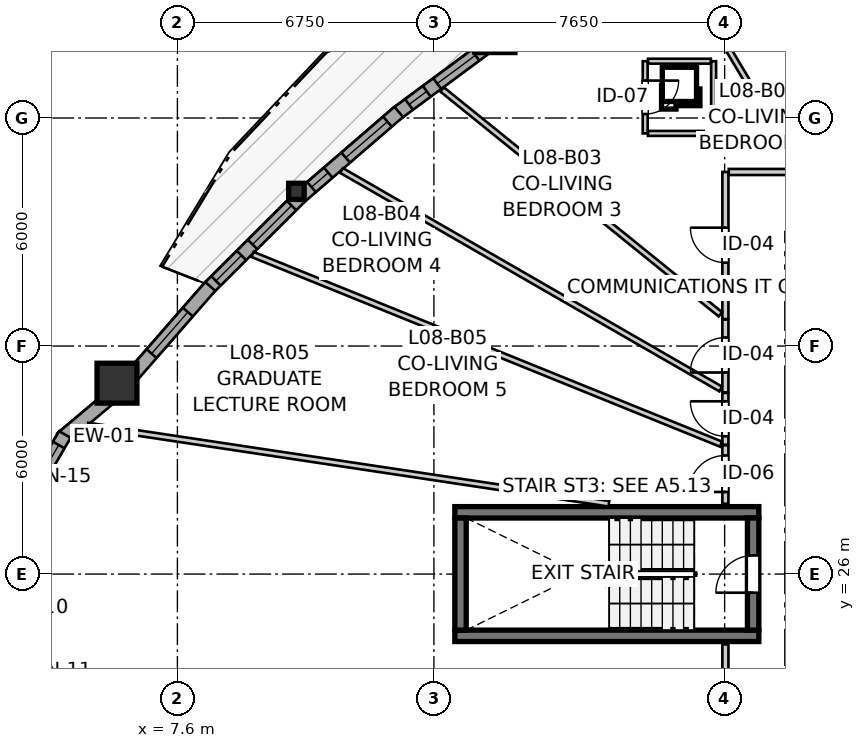
"""IFC4 building model, lengths in metres.
Left out: names, types, materials, properties, quantities, classifications, styles, units other than length and angle.
Written with IfcOpenShell. Run it as: python <this file> out.ifc"""

import sys

from ifc_helpers import new_model, si_unit, direction, frame, frame_2d, origin, origin_2d, place, context, subcontext, project, spatial, rectangle, i_section, extrude, source, transform, mapped, element, fill, save


model = new_model("IFC4")
c1 = context("Model", 3, precision=1e-05, world=origin(), true_north=direction((0.0, 1.0)))
c2 = subcontext(c1, "Body", "Model", "MODEL_VIEW")
j1 = project(units=[si_unit("LENGTHUNIT", "METRE"), si_unit("PLANEANGLEUNIT", "RADIAN")], contexts=[c1])
p1 = place(None, origin())
s1 = spatial("IfcSite", under=j1, at=p1, CompositionType="ELEMENT")
p2 = place(p1, origin())
s2 = spatial("IfcBuilding", under=s1, at=p2, CompositionType="ELEMENT")
p3 = place(p2, frame((0.0, 0.0, 30.2)))
s3 = spatial("IfcBuildingStorey", under=s2, at=p3, CompositionType="ELEMENT", Elevation=30.2)
for number, where, z_axis, x_axis in (
    (1, (14.9, 24.375, 0.0), (0.0, 0.0, 1.0), (1.0, 0.0, 0.0)),
    (2, (22.9, 27.625, 0.0), (0.0, 0.0, 1.0), (-1.0, 0.0, 0.0)),
):
    element("IfcWall", number, at=place(p3, frame(where, z_axis=z_axis, x_axis=x_axis)), inside=s3, PredefinedType="SHEAR", context=c2, shape_type="SweptSolid", body=[
        extrude(rectangle(XDim=8.0, YDim=0.3, at=frame_2d((4.0, 0.0))), origin(), (0.0, 0.0, 1.0), 2.935),
    ])
p4 = place(p3, frame((15.05, 27.475, 0.0), z_axis=(0.0, 0.0, 1.0), x_axis=(0.0, -1.0, 0.0)))
e3 = element("IfcWall", 3, at=p4, inside=s3, PredefinedType="SHEAR", context=c2, shape_type="SweptSolid", body=[
    extrude(rectangle(XDim=2.95, YDim=0.3, at=frame_2d((1.475, 0.0))), origin(), (0.0, 0.0, 1.0), 2.935),
])
p5 = place(p3, frame((22.75, 24.525, 0.0), z_axis=(0.0, 0.0, 1.0), x_axis=(0.0, 1.0, 0.0)))
e4 = element("IfcWall", 4, at=p5, inside=s3, PredefinedType="SHEAR", context=c2, shape_type="SweptSolid", body=[
    extrude(rectangle(XDim=2.95, YDim=0.3, at=frame_2d((1.475, 0.0))), origin(), (0.0, 0.0, 1.0), 2.935),
])
p6 = place(p5, frame((0.985, 0.0, 0.0)))
e5 = element("IfcOpeningElement", 5, at=p6, cuts=e4, PredefinedType="OPENING", context=c2, shape_type="SweptSolid", body=[
    extrude(rectangle(XDim=0.98, YDim=2.15, at=frame_2d((0.49, 1.075))), frame((0.0, 0.16, 0.0), z_axis=(0.0, -1.0, 0.0), x_axis=(1.0, 0.0, 0.0)), (0.0, 0.0, 1.0), 0.32),
])
m1 = source(origin(), c2, "Body", "SweptSolid", [
    extrude(rectangle(XDim=1.05, YDim=1.05, at=origin_2d()), origin(), (0.0, 0.0, 1.0), 2.935),
])
for number, where, z_axis, x_axis in (
    (6, (6.01, 31.023, 0.0), (0.0, 0.0, 1.0), (1.0, 0.0, 0.0)),
    (7, (15.956, 40.247, 0.0), (0.0, 0.0, 1.0), (1.0, 0.0, 0.0)),
):
    element("IfcColumn", number, at=place(p3, frame(where, z_axis=z_axis, x_axis=x_axis)), inside=s3, PredefinedType="COLUMN", context=c2, shape_type="MappedRepresentation", body=[
        mapped(m1, transform((0.0, 0.0, 0.0), x_axis=(1.0, 0.0, 0.0), y_axis=(0.0, 1.0, 0.0), z_axis=(0.0, 0.0, 1.0), scale=1.0)),
    ])
m2 = source(origin(), c2, "Body", "SweptSolid", [
    extrude(i_section(OverallWidth=0.409, OverallDepth=0.425, WebThickness=0.03, FlangeThickness=0.048, FilletRadius=0.015, at=origin_2d()), origin(), (0.0, 0.0, 1.0), 2.935),
])
p7 = place(p3, frame((10.732, 36.07, 0.0), z_axis=(0.0, 0.0, 1.0), x_axis=(1.0, 0.0, 0.0)))
e8 = element("IfcColumn", 8, at=p7, inside=s3, PredefinedType="PILASTER", context=c2, shape_type="MappedRepresentation", body=[
    mapped(m2, transform((0.0, 0.0, 0.0), x_axis=(1.0, 0.0, 0.0), y_axis=(0.0, 1.0, 0.0), z_axis=(0.0, 0.0, 1.0), scale=1.0)),
])
p8 = place(p3, frame((5.893, 30.696, 0.0), z_axis=(0.0, 0.0, 1.0), x_axis=(-0.766001205563, -0.64283913468, 0.0)))
e9 = element("IfcWall", 9, at=p8, inside=s3, PredefinedType="SOLIDWALL", context=c2, shape_type="SweptSolid", body=[
    extrude(rectangle(XDim=1.752, YDim=0.35, at=frame_2d((0.876, 0.0))), origin(), (0.0, 0.0, 1.0), 2.415),
])
p9 = place(p3, frame((4.637, 29.674, 0.0), z_axis=(0.0, 0.0, 1.0), x_axis=(-0.499995423472, -0.866028046028, 0.0)))
e10 = element("IfcWall", 10, at=p9, inside=s3, PredefinedType="SOLIDWALL", context=c2, shape_type="SweptSolid", body=[
    extrude(rectangle(XDim=2.09, YDim=0.35, at=frame_2d((1.045, 0.0))), origin(), (0.0, 0.0, 1.0), 2.415),
])
p10 = place(p9, frame((0.32, 0.0, 0.82)))
e11 = element("IfcOpeningElement", 11, at=p10, cuts=e10, PredefinedType="OPENING", context=c2, shape_type="SweptSolid", body=[
    extrude(rectangle(XDim=1.45, YDim=1.25, at=frame_2d((0.725, 0.625))), frame((0.0, 0.185, 0.0), z_axis=(0.0, -1.0, 0.0), x_axis=(1.0, 0.0, 0.0)), (0.0, 0.0, 1.0), 0.37),
])
p11 = place(p3, frame((3.592, 24.137, 0.0), z_axis=(0.0, 0.0, 1.0), x_axis=(0.499995423472, -0.866028046028, 0.0)))
e12 = element("IfcWall", 12, at=p11, inside=s3, PredefinedType="SOLIDWALL", context=c2, shape_type="SweptSolid", body=[
    extrude(rectangle(XDim=2.09, YDim=0.35, at=frame_2d((1.045, 0.0))), origin(), (0.0, 0.0, 1.0), 2.415),
])
p12 = place(p11, frame((0.42, 0.0, 0.82)))
e13 = element("IfcOpeningElement", 13, at=p12, cuts=e12, PredefinedType="OPENING", context=c2, shape_type="SweptSolid", body=[
    extrude(rectangle(XDim=1.25, YDim=1.35, at=frame_2d((0.625, 0.675))), frame((0.0, 0.185, 0.0), z_axis=(0.0, -1.0, 0.0), x_axis=(1.0, 0.0, 0.0)), (0.0, 0.0, 1.0), 0.37),
])
p13 = place(p3, frame((15.819, 39.928, 0.0), z_axis=(0.0, 0.0, 1.0), x_axis=(-0.803825144674, -0.594865645999, 0.0)))
e14 = element("IfcWall", 14, at=p13, inside=s3, PredefinedType="SOLIDWALL", context=c2, shape_type="SweptSolid", body=[
    extrude(rectangle(XDim=3.066, YDim=0.35, at=frame_2d((1.533, 0.0))), origin(), (0.0, 0.0, 1.0), 2.415),
])
p14 = place(p13, frame((0.469, 0.0, 0.82)))
e15 = element("IfcOpeningElement", 15, at=p14, cuts=e14, PredefinedType="OPENING", context=c2, shape_type="SweptSolid", body=[
    extrude(rectangle(XDim=1.25, YDim=1.35, at=frame_2d((0.625, 0.675))), frame((0.0, 0.185, 0.0), z_axis=(0.0, -1.0, 0.0), x_axis=(1.0, 0.0, 0.0)), (0.0, 0.0, 1.0), 0.37),
])
p15 = place(p13, frame((2.062, 0.0, 0.82)))
e16 = element("IfcOpeningElement", 16, at=p15, cuts=e14, PredefinedType="OPENING", context=c2, shape_type="SweptSolid", body=[
    extrude(rectangle(XDim=0.58, YDim=1.35, at=frame_2d((0.29, 0.675))), frame((0.0, 0.185, 0.0), z_axis=(0.0, -1.0, 0.0), x_axis=(1.0, 0.0, 0.0)), (0.0, 0.0, 1.0), 0.37),
])
p16 = place(p3, frame((13.424, 38.16, 0.0), z_axis=(0.0, 0.0, 1.0), x_axis=(-0.757512075852, -0.652821150805, 0.0)))
e17 = element("IfcWall", 17, at=p16, inside=s3, PredefinedType="SOLIDWALL", context=c2, shape_type="SweptSolid", body=[
    extrude(rectangle(XDim=3.384, YDim=0.35, at=frame_2d((1.692, 0.0))), origin(), (0.0, 0.0, 1.0), 2.415),
])
p17 = place(p16, frame((0.392, 0.0, 0.82)))
e18 = element("IfcOpeningElement", 18, at=p17, cuts=e17, PredefinedType="OPENING", context=c2, shape_type="SweptSolid", body=[
    extrude(rectangle(XDim=1.45, YDim=1.25, at=frame_2d((0.725, 0.625))), frame((0.0, 0.185, 0.0), z_axis=(0.0, -1.0, 0.0), x_axis=(1.0, 0.0, 0.0)), (0.0, 0.0, 1.0), 0.37),
])
p18 = place(p16, frame((2.449, 0.0, 0.82)))
e19 = element("IfcOpeningElement", 19, at=p18, cuts=e17, PredefinedType="OPENING", context=c2, shape_type="SweptSolid", body=[
    extrude(rectangle(XDim=0.58, YDim=1.35, at=frame_2d((0.29, 0.675))), frame((0.0, 0.185, 0.0), z_axis=(0.0, -1.0, 0.0), x_axis=(1.0, 0.0, 0.0)), (0.0, 0.0, 1.0), 0.37),
])
p19 = place(p3, frame((10.841, 35.932, 0.0), z_axis=(0.0, 0.0, 1.0), x_axis=(-0.708383272101, -0.70582798174, 0.0)))
e20 = element("IfcWall", 20, at=p19, inside=s3, PredefinedType="SOLIDWALL", context=c2, shape_type="SweptSolid", body=[
    extrude(rectangle(XDim=3.439, YDim=0.35, at=frame_2d((1.72, 0.0))), origin(), (0.0, 0.0, 1.0), 2.415),
])
p20 = place(p19, frame((0.334, 0.0, 0.82)))
e21 = element("IfcOpeningElement", 21, at=p20, cuts=e20, PredefinedType="OPENING", context=c2, shape_type="SweptSolid", body=[
    extrude(rectangle(XDim=1.45, YDim=1.25, at=frame_2d((0.725, 0.625))), frame((0.0, 0.185, 0.0), z_axis=(0.0, -1.0, 0.0), x_axis=(1.0, 0.0, 0.0)), (0.0, 0.0, 1.0), 0.37),
])
p21 = place(p19, frame((2.194, 0.0, 0.82)))
e22 = element("IfcOpeningElement", 22, at=p21, cuts=e20, PredefinedType="OPENING", context=c2, shape_type="SweptSolid", body=[
    extrude(rectangle(XDim=0.95, YDim=1.35, at=frame_2d((0.475, 0.675))), frame((0.0, 0.185, 0.0), z_axis=(0.0, -1.0, 0.0), x_axis=(1.0, 0.0, 0.0)), (0.0, 0.0, 1.0), 0.37),
])
p22 = place(p3, frame((8.465, 33.569, 0.0), z_axis=(0.0, 0.0, 1.0), x_axis=(-0.657600500685, -0.753366830634, 0.0)))
e23 = element("IfcWall", 23, at=p22, inside=s3, PredefinedType="SOLIDWALL", context=c2, shape_type="SweptSolid", body=[
    extrude(rectangle(XDim=3.233, YDim=0.35, at=frame_2d((1.616, 0.0))), origin(), (0.0, 0.0, 1.0), 2.415),
])
p23 = place(p22, frame((0.896, 0.0, 0.82)))
e24 = element("IfcOpeningElement", 24, at=p23, cuts=e23, PredefinedType="OPENING", context=c2, shape_type="SweptSolid", body=[
    extrude(rectangle(XDim=1.45, YDim=1.25, at=frame_2d((0.725, 0.625))), frame((0.0, 0.185, 0.0), z_axis=(0.0, -1.0, 0.0), x_axis=(1.0, 0.0, 0.0)), (0.0, 0.0, 1.0), 0.37),
])
p24 = place(p3, frame((22.02, 16.883, 0.0), z_axis=(0.0, 0.0, 1.0), x_axis=(0.0, 1.0, 0.0)))
e25 = element("IfcWall", 25, at=p24, inside=s3, PredefinedType="PARTITIONING", context=c2, shape_type="SweptSolid", body=[
    extrude(rectangle(XDim=7.267, YDim=0.16, at=frame_2d((3.633, 0.0))), origin(), (0.0, 0.0, 1.0), 2.935),
])
p25 = place(p24, frame((2.845, 0.0, 0.0)))
e26 = element("IfcOpeningElement", 26, at=p25, cuts=e25, PredefinedType="OPENING", context=c2, shape_type="SweptSolid", body=[
    extrude(rectangle(XDim=1.3, YDim=2.1, at=frame_2d((0.65, 1.05))), frame((0.0, 0.09, 0.0), z_axis=(0.0, -1.0, 0.0), x_axis=(1.0, 0.0, 0.0)), (0.0, 0.0, 1.0), 0.18),
])
p26 = place(p3, frame((22.02, 32.71, 0.0), z_axis=(0.0, 0.0, 1.0), x_axis=(0.0, 1.0, 0.0)))
e27 = element("IfcWall", 27, at=p26, inside=s3, PredefinedType="PARTITIONING", context=c2, shape_type="SweptSolid", body=[
    extrude(rectangle(XDim=3.87, YDim=0.16, at=frame_2d((1.935, 0.0))), origin(), (0.0, 0.0, 1.0), 2.935),
])
p27 = place(p26, frame((1.485, 0.0, 0.0)))
e28 = element("IfcOpeningElement", 28, at=p27, cuts=e27, PredefinedType="OPENING", context=c2, shape_type="SweptSolid", body=[
    extrude(rectangle(XDim=0.92, YDim=2.1, at=frame_2d((0.46, 1.05))), frame((0.0, 0.09, 0.0), z_axis=(0.0, -1.0, 0.0), x_axis=(1.0, 0.0, 0.0)), (0.0, 0.0, 1.0), 0.18),
])
p28 = place(p3, frame((22.02, 30.782, 0.0), z_axis=(0.0, 0.0, 1.0), x_axis=(0.0, 1.0, 0.0)))
e29 = element("IfcWall", 29, at=p28, inside=s3, PredefinedType="PARTITIONING", context=c2, shape_type="SweptSolid", body=[
    extrude(rectangle(XDim=1.913, YDim=0.16, at=frame_2d((0.957, 0.0))), origin(), (0.0, 0.0, 1.0), 2.935),
])
p29 = place(p28, frame((0.522, 0.0, 0.0)))
e30 = element("IfcOpeningElement", 30, at=p29, cuts=e29, PredefinedType="OPENING", context=c2, shape_type="SweptSolid", body=[
    extrude(rectangle(XDim=0.92, YDim=2.1, at=frame_2d((0.46, 1.05))), frame((0.0, 0.09, 0.0), z_axis=(0.0, -1.0, 0.0), x_axis=(1.0, 0.0, 0.0)), (0.0, 0.0, 1.0), 0.18),
])
p30 = place(p3, frame((19.91, 39.495, 0.0), z_axis=(0.0, 0.0, 1.0), x_axis=(0.0, -1.0, 0.0)))
e31 = element("IfcWall", 31, at=p30, inside=s3, PredefinedType="PARTITIONING", context=c2, shape_type="SweptSolid", body=[
    extrude(rectangle(XDim=1.9, YDim=0.13, at=frame_2d((0.95, 0.0))), origin(), (0.0, 0.0, 1.0), 2.935),
])
p31 = place(p30, frame((0.51, 0.0, 0.0)))
e32 = element("IfcOpeningElement", 32, at=p31, cuts=e31, PredefinedType="OPENING", context=c2, shape_type="SweptSolid", body=[
    extrude(rectangle(XDim=0.88, YDim=2.05, at=frame_2d((0.44, 1.025))), frame((0.0, 0.075, 0.0), z_axis=(0.0, -1.0, 0.0), x_axis=(1.0, 0.0, 0.0)), (0.0, 0.0, 1.0), 0.15),
])
p32 = place(p3, frame((22.02, 27.85, 0.0), z_axis=(0.0, 0.0, 1.0), x_axis=(0.0, 1.0, 0.0)))
e33 = element("IfcWall", 33, at=p32, inside=s3, PredefinedType="PARTITIONING", context=c2, shape_type="SweptSolid", body=[
    extrude(rectangle(XDim=1.539, YDim=0.16, at=frame_2d((0.77, 0.0))), origin(), (0.0, 0.0, 1.0), 2.935),
])
p33 = place(p32, frame((0.311, 0.0, 0.0)))
e34 = element("IfcOpeningElement", 34, at=p33, cuts=e33, PredefinedType="OPENING", context=c2, shape_type="SweptSolid", body=[
    extrude(rectangle(XDim=0.96, YDim=2.1, at=frame_2d((0.48, 1.05))), frame((0.0, 0.09, 0.0), z_axis=(0.0, -1.0, 0.0), x_axis=(1.0, 0.0, 0.0)), (0.0, 0.0, 1.0), 0.18),
])
p34 = place(p3, frame((22.02, 29.404, 0.0), z_axis=(0.0, 0.0, 1.0), x_axis=(0.0, 1.0, 0.0)))
e35 = element("IfcWall", 35, at=p34, inside=s3, PredefinedType="PARTITIONING", context=c2, shape_type="SweptSolid", body=[
    extrude(rectangle(XDim=1.363, YDim=0.16, at=frame_2d((0.682, 0.0))), origin(), (0.0, 0.0, 1.0), 2.935),
])
p35 = place(p34, frame((0.222, 0.0, 0.0)))
e36 = element("IfcOpeningElement", 36, at=p35, cuts=e35, PredefinedType="OPENING", context=c2, shape_type="SweptSolid", body=[
    extrude(rectangle(XDim=0.92, YDim=2.1, at=frame_2d((0.46, 1.05))), frame((0.0, 0.09, 0.0), z_axis=(0.0, -1.0, 0.0), x_axis=(1.0, 0.0, 0.0)), (0.0, 0.0, 1.0), 0.18),
])
p36 = place(p3, frame((5.242, 29.91, 0.0), z_axis=(0.0, 0.0, 1.0), x_axis=(0.988899381561, -0.148586719285, 0.0)))
e37 = element("IfcWall", 37, at=p36, inside=s3, PredefinedType="PARTITIONING", context=c2, shape_type="SweptSolid", body=[
    extrude(rectangle(XDim=13.864, YDim=0.145, at=frame_2d((6.932, 0.0))), origin(), (0.0, 0.0, 1.0), 2.935),
])
p37 = place(p3, frame((9.577, 34.41, 0.0), z_axis=(0.0, 0.0, 1.0), x_axis=(0.926920362809, -0.375258099194, 0.0)))
e38 = element("IfcWall", 38, at=p37, inside=s3, PredefinedType="PARTITIONING", context=c2, shape_type="SweptSolid", body=[
    extrude(rectangle(XDim=13.3, YDim=0.145, at=frame_2d((6.65, 0.0))), origin(), (0.0, 0.0, 1.0), 2.935),
])
p38 = place(p3, frame((11.92, 36.618, 0.0), z_axis=(0.0, 0.0, 1.0), x_axis=(0.866473494239, -0.499223080177, 0.0)))
e39 = element("IfcWall", 39, at=p38, inside=s3, PredefinedType="PARTITIONING", context=c2, shape_type="SweptSolid", body=[
    extrude(rectangle(XDim=11.514, YDim=0.145, at=frame_2d((5.757, 0.0))), origin(), (0.0, 0.0, 1.0), 2.935),
])
p39 = place(p3, frame((14.566, 38.751, 0.0), z_axis=(0.0, 0.0, 1.0), x_axis=(0.777881688073, -0.628410756879, 0.0)))
e40 = element("IfcWall", 40, at=p39, inside=s3, PredefinedType="PARTITIONING", context=c2, shape_type="SweptSolid", body=[
    extrude(rectangle(XDim=9.413, YDim=0.145, at=frame_2d((4.707, 0.0))), origin(), (0.0, 0.0, 1.0), 2.935),
])
p40 = place(p3, frame((20.481, 42.51, 0.0), z_axis=(0.0, 0.0, 1.0), x_axis=(0.513067331262, -0.858348363773, 0.0)))
e41 = element("IfcWall", 41, at=p40, inside=s3, PredefinedType="PARTITIONING", context=c2, shape_type="SweptSolid", body=[
    extrude(rectangle(XDim=6.765, YDim=0.145, at=frame_2d((3.382, 0.0))), origin(), (0.0, 0.0, 1.0), 2.935),
])
p41 = place(p3, frame((22.108, 36.58, 0.0), z_axis=(0.0, 0.0, 1.0), x_axis=(1.0, 0.0, 0.0)))
e42 = element("IfcWall", 42, at=p41, inside=s3, PredefinedType="PARTITIONING", context=c2, shape_type="SweptSolid", body=[
    extrude(rectangle(XDim=1.746, YDim=0.16, at=frame_2d((0.873, 0.0))), origin(), (0.0, 0.0, 1.0), 2.543),
])
p42 = place(p3, frame((21.71, 37.595, 0.0), z_axis=(0.0, 0.0, 1.0), x_axis=(0.0, 1.0, 0.0)))
e43 = element("IfcWall", 43, at=p42, inside=s3, PredefinedType="PARTITIONING", context=c2, shape_type="SweptSolid", body=[
    extrude(rectangle(XDim=1.9, YDim=0.13, at=frame_2d((0.95, 0.0))), origin(), (0.0, 0.0, 1.0), 2.935),
])
for number, where, z_axis, x_axis in (
    (44, (19.983, 39.495, 0.0), (0.0, 0.0, 1.0), (1.0, 0.0, 0.0)),
    (45, (19.983, 37.595, 0.0), (0.0, 0.0, 1.0), (1.0, 0.0, 0.0)),
):
    element("IfcWall", number, at=place(p3, frame(where, z_axis=z_axis, x_axis=x_axis)), inside=s3, PredefinedType="PARTITIONING", context=c2, shape_type="SweptSolid", body=[
        extrude(rectangle(XDim=1.654, YDim=0.13, at=frame_2d((0.827, 0.0))), origin(), (0.0, 0.0, 1.0), 2.935),
    ])
m3 = source(origin(), c2, "Body", "SweptSolid", [
    extrude(rectangle(XDim=1.45, YDim=1.25, at=frame_2d((0.725, 0.625))), frame((0.0, 0.03, 0.0), z_axis=(0.0, -1.0, 0.0), x_axis=(1.0, 0.0, 0.0)), (0.0, 0.0, 1.0), 0.06),
])
p43 = place(p10, origin())
e46 = element("IfcWindow", 46, at=p43, inside=s3, PartitioningType="SINGLE_PANEL", PredefinedType="WINDOW", context=c2, shape_type="MappedRepresentation", body=[
    mapped(m3, transform((0.0, 0.0, 0.0), x_axis=(1.0, 0.0, 0.0), y_axis=(0.0, 1.0, 0.0), z_axis=(0.0, 0.0, 1.0), scale=1.0)),
])
fill(e11, e46)
m4 = source(origin(), c2, "Body", "SweptSolid", [
    extrude(rectangle(XDim=1.25, YDim=1.35, at=frame_2d((0.625, 0.675))), frame((0.0, 0.03, 0.0), z_axis=(0.0, -1.0, 0.0), x_axis=(1.0, 0.0, 0.0)), (0.0, 0.0, 1.0), 0.06),
])
p44 = place(p12, origin())
e47 = element("IfcWindow", 47, at=p44, inside=s3, PartitioningType="SINGLE_PANEL", PredefinedType="WINDOW", context=c2, shape_type="MappedRepresentation", body=[
    mapped(m4, transform((0.0, 0.0, 0.0), x_axis=(1.0, 0.0, 0.0), y_axis=(0.0, 1.0, 0.0), z_axis=(0.0, 0.0, 1.0), scale=1.0)),
])
fill(e13, e47)
p45 = place(p14, origin())
e48 = element("IfcWindow", 48, at=p45, inside=s3, PartitioningType="SINGLE_PANEL", PredefinedType="WINDOW", context=c2, shape_type="MappedRepresentation", body=[
    mapped(m4, transform((0.0, 0.0, 0.0), x_axis=(1.0, 0.0, 0.0), y_axis=(0.0, 1.0, 0.0), z_axis=(0.0, 0.0, 1.0), scale=1.0)),
])
fill(e15, e48)
m5 = source(origin(), c2, "Body", "SweptSolid", [
    extrude(rectangle(XDim=0.58, YDim=1.35, at=frame_2d((0.29, 0.675))), frame((0.0, 0.03, 0.0), z_axis=(0.0, -1.0, 0.0), x_axis=(1.0, 0.0, 0.0)), (0.0, 0.0, 1.0), 0.06),
])
p46 = place(p15, origin())
e49 = element("IfcWindow", 49, at=p46, inside=s3, PartitioningType="SINGLE_PANEL", PredefinedType="WINDOW", context=c2, shape_type="MappedRepresentation", body=[
    mapped(m5, transform((0.0, 0.0, 0.0), x_axis=(1.0, 0.0, 0.0), y_axis=(0.0, 1.0, 0.0), z_axis=(0.0, 0.0, 1.0), scale=1.0)),
])
fill(e16, e49)
p47 = place(p17, origin())
e50 = element("IfcWindow", 50, at=p47, inside=s3, PartitioningType="SINGLE_PANEL", PredefinedType="WINDOW", context=c2, shape_type="MappedRepresentation", body=[
    mapped(m3, transform((0.0, 0.0, 0.0), x_axis=(1.0, 0.0, 0.0), y_axis=(0.0, 1.0, 0.0), z_axis=(0.0, 0.0, 1.0), scale=1.0)),
])
fill(e18, e50)
p48 = place(p18, origin())
e51 = element("IfcWindow", 51, at=p48, inside=s3, PartitioningType="SINGLE_PANEL", PredefinedType="WINDOW", context=c2, shape_type="MappedRepresentation", body=[
    mapped(m5, transform((0.0, 0.0, 0.0), x_axis=(1.0, 0.0, 0.0), y_axis=(0.0, 1.0, 0.0), z_axis=(0.0, 0.0, 1.0), scale=1.0)),
])
fill(e19, e51)
p49 = place(p20, origin())
e52 = element("IfcWindow", 52, at=p49, inside=s3, PartitioningType="SINGLE_PANEL", PredefinedType="WINDOW", context=c2, shape_type="MappedRepresentation", body=[
    mapped(m3, transform((0.0, 0.0, 0.0), x_axis=(1.0, 0.0, 0.0), y_axis=(0.0, 1.0, 0.0), z_axis=(0.0, 0.0, 1.0), scale=1.0)),
])
fill(e21, e52)
m6 = source(origin(), c2, "Body", "SweptSolid", [
    extrude(rectangle(XDim=0.95, YDim=1.35, at=frame_2d((0.475, 0.675))), frame((0.0, 0.03, 0.0), z_axis=(0.0, -1.0, 0.0), x_axis=(1.0, 0.0, 0.0)), (0.0, 0.0, 1.0), 0.06),
])
p50 = place(p21, origin())
e53 = element("IfcWindow", 53, at=p50, inside=s3, PartitioningType="SINGLE_PANEL", PredefinedType="WINDOW", context=c2, shape_type="MappedRepresentation", body=[
    mapped(m6, transform((0.0, 0.0, 0.0), x_axis=(1.0, 0.0, 0.0), y_axis=(0.0, 1.0, 0.0), z_axis=(0.0, 0.0, 1.0), scale=1.0)),
])
fill(e22, e53)
p51 = place(p23, origin())
e54 = element("IfcWindow", 54, at=p51, inside=s3, PartitioningType="SINGLE_PANEL", PredefinedType="WINDOW", context=c2, shape_type="MappedRepresentation", body=[
    mapped(m3, transform((0.0, 0.0, 0.0), x_axis=(1.0, 0.0, 0.0), y_axis=(0.0, 1.0, 0.0), z_axis=(0.0, 0.0, 1.0), scale=1.0)),
])
fill(e24, e54)
m7 = source(origin(), c2, "Body", "SweptSolid", [
    extrude(rectangle(XDim=0.98, YDim=2.15, at=frame_2d((0.49, 1.075))), frame((0.0, 0.025, 0.0), z_axis=(0.0, -1.0, 0.0), x_axis=(1.0, 0.0, 0.0)), (0.0, 0.0, 1.0), 0.05),
])
p52 = place(p6, origin())
e55 = element("IfcDoor", 55, at=p52, inside=s3, OperationType="SINGLE_SWING_LEFT", PredefinedType="DOOR", context=c2, shape_type="MappedRepresentation", body=[
    mapped(m7, transform((0.0, 0.0, 0.0), x_axis=(1.0, 0.0, 0.0), y_axis=(0.0, 1.0, 0.0), z_axis=(0.0, 0.0, 1.0), scale=1.0)),
])
fill(e5, e55)
m8 = source(origin(), c2, "Body", "SweptSolid", [
    extrude(rectangle(XDim=0.92, YDim=2.1, at=frame_2d((0.46, 1.05))), frame((0.0, 0.025, 0.0), z_axis=(0.0, -1.0, 0.0), x_axis=(1.0, 0.0, 0.0)), (0.0, 0.0, 1.0), 0.05),
])
p53 = place(p27, origin())
e56 = element("IfcDoor", 56, at=p53, inside=s3, OperationType="SINGLE_SWING_RIGHT", PredefinedType="DOOR", context=c2, shape_type="MappedRepresentation", body=[
    mapped(m8, transform((0.0, 0.0, 0.0), x_axis=(1.0, 0.0, 0.0), y_axis=(0.0, 1.0, 0.0), z_axis=(0.0, 0.0, 1.0), scale=1.0)),
])
fill(e28, e56)
p54 = place(p29, origin())
e57 = element("IfcDoor", 57, at=p54, inside=s3, OperationType="SINGLE_SWING_LEFT", PredefinedType="DOOR", context=c2, shape_type="MappedRepresentation", body=[
    mapped(m8, transform((0.0, 0.0, 0.0), x_axis=(1.0, 0.0, 0.0), y_axis=(0.0, 1.0, 0.0), z_axis=(0.0, 0.0, 1.0), scale=1.0)),
])
fill(e30, e57)
m9 = source(origin(), c2, "Body", "SweptSolid", [
    extrude(rectangle(XDim=0.88, YDim=2.05, at=frame_2d((0.44, 1.025))), frame((0.0, 0.025, 0.0), z_axis=(0.0, -1.0, 0.0), x_axis=(1.0, 0.0, 0.0)), (0.0, 0.0, 1.0), 0.05),
])
p55 = place(p31, origin())
e58 = element("IfcDoor", 58, at=p55, inside=s3, OperationType="SINGLE_SWING_LEFT", PredefinedType="DOOR", context=c2, shape_type="MappedRepresentation", body=[
    mapped(m9, transform((0.0, 0.0, 0.0), x_axis=(1.0, 0.0, 0.0), y_axis=(0.0, 1.0, 0.0), z_axis=(0.0, 0.0, 1.0), scale=1.0)),
])
fill(e32, e58)
m10 = source(origin(), c2, "Body", "SweptSolid", [
    extrude(rectangle(XDim=0.96, YDim=2.1, at=frame_2d((0.48, 1.05))), frame((0.0, 0.025, 0.0), z_axis=(0.0, -1.0, 0.0), x_axis=(1.0, 0.0, 0.0)), (0.0, 0.0, 1.0), 0.05),
])
p56 = place(p33, origin())
e59 = element("IfcDoor", 59, at=p56, inside=s3, OperationType="SINGLE_SWING_LEFT", PredefinedType="DOOR", context=c2, shape_type="MappedRepresentation", body=[
    mapped(m10, transform((0.0, 0.0, 0.0), x_axis=(1.0, 0.0, 0.0), y_axis=(0.0, 1.0, 0.0), z_axis=(0.0, 0.0, 1.0), scale=1.0)),
])
fill(e34, e59)
p57 = place(p35, origin())
e60 = element("IfcDoor", 60, at=p57, inside=s3, OperationType="SINGLE_SWING_RIGHT", PredefinedType="DOOR", context=c2, shape_type="MappedRepresentation", body=[
    mapped(m8, transform((0.0, 0.0, 0.0), x_axis=(1.0, 0.0, 0.0), y_axis=(0.0, 1.0, 0.0), z_axis=(0.0, 0.0, 1.0), scale=1.0)),
])
fill(e36, e60)
save(model, sys.argv[1])
